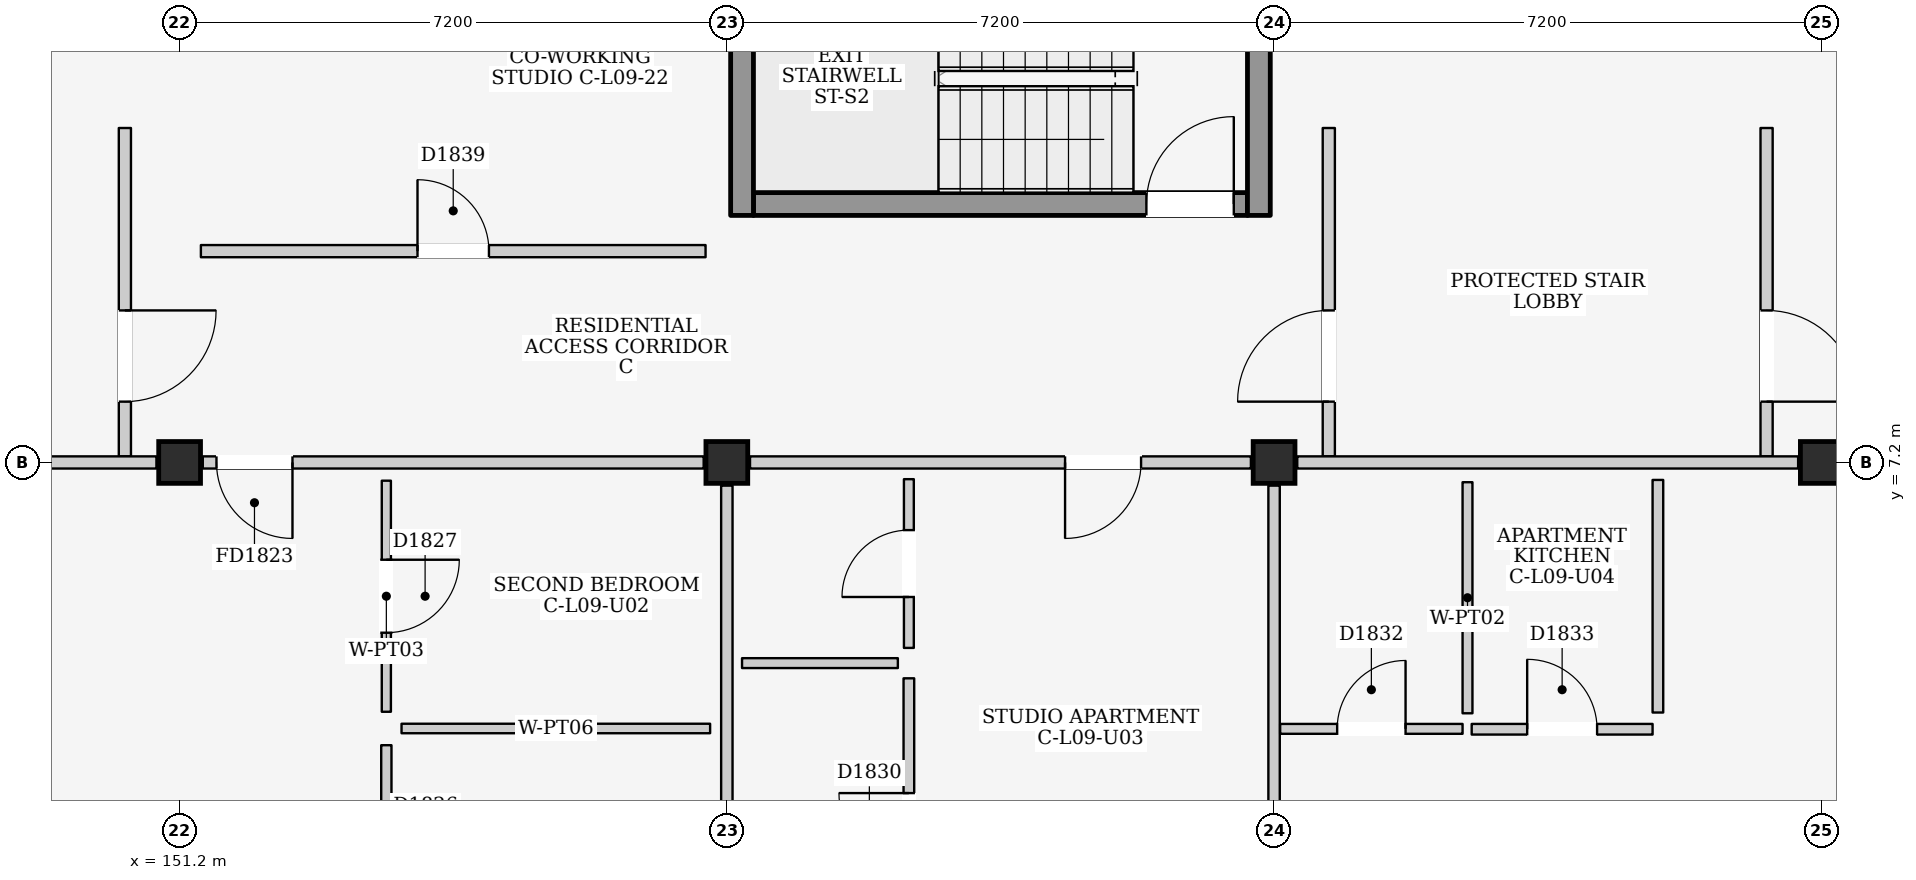
"""IFC4 building model, lengths in metres.
Left out: names, types, materials, properties, quantities, classifications, styles, units other than length and angle.
Written with IfcOpenShell. Run it as: python <this file> out.ifc"""

import sys

from ifc_helpers import new_model, si_unit, direction, frame, frame_2d, origin, origin_2d, place, context, subcontext, project, spatial, rectangle, extrude, element, fill, save


model = new_model("IFC4")
c1 = context("Model", 3, precision=1e-05, world=origin(), true_north=direction((0.0, 1.0)))
c2 = subcontext(c1, "Body", "Model", "MODEL_VIEW")
j1 = project(units=[si_unit("LENGTHUNIT", "METRE"), si_unit("PLANEANGLEUNIT", "RADIAN")], contexts=[c1])
p1 = place(None, origin())
s1 = spatial("IfcSite", under=j1, at=p1, CompositionType="ELEMENT")
p2 = place(p1, origin())
s2 = spatial("IfcBuilding", under=s1, at=p2, CompositionType="ELEMENT")
p3 = place(p2, frame((0.0, 0.0, 31.5)))
s3 = spatial("IfcBuildingStorey", under=s2, at=p3, CompositionType="ELEMENT", Elevation=31.5)
for number, where, z_axis, x_axis in (
    (1, (151.2, 7.2, 0.0), (0.0, 0.0, 1.0), (1.0, 0.0, 0.0)),
    (2, (158.4, 7.2, 0.0), (0.0, 0.0, 1.0), (1.0, 0.0, 0.0)),
    (3, (165.6, 7.2, 0.0), (0.0, 0.0, 1.0), (1.0, 0.0, 0.0)),
    (4, (172.8, 7.2, 0.0), (0.0, 0.0, 1.0), (1.0, 0.0, 0.0)),
):
    element("IfcColumn", number, at=place(p3, frame(where, z_axis=z_axis, x_axis=x_axis)), inside=s3, PredefinedType="COLUMN", context=c2, shape_type="SweptSolid", body=[
        extrude(rectangle(XDim=0.55, YDim=0.55, at=origin_2d()), origin(), (0.0, 0.0, 1.0), 3.3),
    ])
p4 = place(p3, frame((150.48, 7.28, 0.0), z_axis=(0.0, 0.0, 1.0), x_axis=(0.0, 1.0, 0.0)))
e5 = element("IfcWall", 5, at=p4, inside=s3, PredefinedType="PARTITIONING", context=c2, shape_type="SweptSolid", body=[
    extrude(rectangle(XDim=4.32, YDim=0.16, at=frame_2d((2.16, 0.0))), origin(), (0.0, 0.0, 1.0), 3.08),
])
p5 = place(p4, frame((0.72, 0.0, 0.0)))
e6 = element("IfcOpeningElement", 6, at=p5, cuts=e5, PredefinedType="OPENING", context=c2, shape_type="SweptSolid", body=[
    extrude(rectangle(XDim=1.2, YDim=2.2, at=frame_2d((0.6, 1.1))), frame((0.0, 0.095, 0.0), z_axis=(0.0, -1.0, 0.0), x_axis=(1.0, 0.0, 0.0)), (0.0, 0.0, 1.0), 0.19),
])
p6 = place(p3, frame((158.75, 10.6, 0.0), z_axis=(0.0, 0.0, 1.0), x_axis=(1.0, 0.0, 0.0)))
e7 = element("IfcWall", 7, at=p6, inside=s3, PredefinedType="SHEAR", context=c2, shape_type="SweptSolid", body=[
    extrude(rectangle(XDim=6.5, YDim=0.3, at=frame_2d((3.25, 0.0))), origin(), (0.0, 0.0, 1.0), 3.08),
])
p7 = place(p6, frame((5.17, 0.0, 0.0)))
e8 = element("IfcOpeningElement", 8, at=p7, cuts=e7, PredefinedType="OPENING", context=c2, shape_type="SweptSolid", body=[
    extrude(rectangle(XDim=1.15, YDim=2.2, at=frame_2d((0.575, 1.1))), frame((0.0, 0.165, 0.0), z_axis=(0.0, -1.0, 0.0), x_axis=(1.0, 0.0, 0.0)), (0.0, 0.0, 1.0), 0.33),
])
for number, where, z_axis, x_axis in (
    (9, (158.6, 10.45, 0.0), (0.0, 0.0, 1.0), (0.0, 1.0, 0.0)),
    (10, (165.4, 10.45, 0.0), (0.0, 0.0, 1.0), (0.0, 1.0, 0.0)),
):
    element("IfcWall", number, at=place(p3, frame(where, z_axis=z_axis, x_axis=x_axis)), inside=s3, PredefinedType="SHEAR", context=c2, shape_type="SweptSolid", body=[
        extrude(rectangle(XDim=3.6, YDim=0.3, at=frame_2d((1.8, 0.0))), origin(), (0.0, 0.0, 1.0), 3.08),
    ])
p8 = place(p3, frame((166.32, 7.28, 0.0), z_axis=(0.0, 0.0, 1.0), x_axis=(0.0, 1.0, 0.0)))
e11 = element("IfcWall", 11, at=p8, inside=s3, PredefinedType="PARTITIONING", context=c2, shape_type="SweptSolid", body=[
    extrude(rectangle(XDim=4.32, YDim=0.16, at=frame_2d((2.16, 0.0))), origin(), (0.0, 0.0, 1.0), 3.08),
])
p9 = place(p8, frame((0.72, 0.0, 0.0)))
e12 = element("IfcOpeningElement", 12, at=p9, cuts=e11, PredefinedType="OPENING", context=c2, shape_type="SweptSolid", body=[
    extrude(rectangle(XDim=1.2, YDim=2.2, at=frame_2d((0.6, 1.1))), frame((0.0, 0.095, 0.0), z_axis=(0.0, -1.0, 0.0), x_axis=(1.0, 0.0, 0.0)), (0.0, 0.0, 1.0), 0.19),
])
p10 = place(p3, frame((172.08, 7.28, 0.0), z_axis=(0.0, 0.0, 1.0), x_axis=(0.0, 1.0, 0.0)))
e13 = element("IfcWall", 13, at=p10, inside=s3, PredefinedType="PARTITIONING", context=c2, shape_type="SweptSolid", body=[
    extrude(rectangle(XDim=4.32, YDim=0.16, at=frame_2d((2.16, 0.0))), origin(), (0.0, 0.0, 1.0), 3.08),
])
p11 = place(p10, frame((0.72, 0.0, 0.0)))
e14 = element("IfcOpeningElement", 14, at=p11, cuts=e13, PredefinedType="OPENING", context=c2, shape_type="SweptSolid", body=[
    extrude(rectangle(XDim=1.2, YDim=2.2, at=frame_2d((0.6, 1.1))), frame((0.0, 0.095, 0.0), z_axis=(0.0, -1.0, 0.0), x_axis=(1.0, 0.0, 0.0)), (0.0, 0.0, 1.0), 0.19),
])
p12 = place(p3, frame((144.305, 7.2, 0.0), z_axis=(0.0, 0.0, 1.0), x_axis=(1.0, 0.0, 0.0)))
e15 = element("IfcWall", 15, at=p12, inside=s3, PredefinedType="PARTITIONING", context=c2, shape_type="SweptSolid", body=[
    extrude(rectangle(XDim=6.59, YDim=0.16, at=frame_2d((3.295, 0.0))), origin(), (0.0, 0.0, 1.0), 2.465),
])
p13 = place(p3, frame((151.505, 7.2, 0.0), z_axis=(0.0, 0.0, 1.0), x_axis=(1.0, 0.0, 0.0)))
e16 = element("IfcWall", 16, at=p13, inside=s3, PredefinedType="PARTITIONING", context=c2, shape_type="SweptSolid", body=[
    extrude(rectangle(XDim=6.59, YDim=0.16, at=frame_2d((3.295, 0.0))), origin(), (0.0, 0.0, 1.0), 2.465),
])
p14 = place(p13, frame((0.18, 0.0, 0.0)))
e17 = element("IfcOpeningElement", 17, at=p14, cuts=e16, PredefinedType="OPENING", context=c2, shape_type="SweptSolid", body=[
    extrude(rectangle(XDim=1.0, YDim=2.15, at=frame_2d((0.5, 1.075))), frame((0.0, 0.095, 0.0), z_axis=(0.0, -1.0, 0.0), x_axis=(1.0, 0.0, 0.0)), (0.0, 0.0, 1.0), 0.19),
])
p15 = place(p3, frame((158.4, 0.305, 0.0), z_axis=(0.0, 0.0, 1.0), x_axis=(0.0, 1.0, 0.0)))
e18 = element("IfcWall", 18, at=p15, inside=s3, PredefinedType="PARTITIONING", context=c2, shape_type="SweptSolid", body=[
    extrude(rectangle(XDim=6.59, YDim=0.15, at=frame_2d((3.295, 0.0))), origin(), (0.0, 0.0, 1.0), 2.565),
])
p16 = place(p3, frame((153.92, 0.44, 0.0), z_axis=(0.0, 0.0, 1.0), x_axis=(0.0, 1.0, 0.0)))
e19 = element("IfcWall", 19, at=p16, inside=s3, PredefinedType="PARTITIONING", context=c2, shape_type="SweptSolid", body=[
    extrude(rectangle(XDim=3.04, YDim=0.135, at=frame_2d((1.52, 0.0))), origin(), (0.0, 0.0, 1.0), 3.08),
])
p17 = place(p16, frame((1.045, 0.0, 0.0)))
e20 = element("IfcOpeningElement", 20, at=p17, cuts=e19, PredefinedType="OPENING", context=c2, shape_type="SweptSolid", body=[
    extrude(rectangle(XDim=0.95, YDim=2.15, at=frame_2d((0.475, 1.075))), frame((0.0, 0.083, 0.0), z_axis=(0.0, -1.0, 0.0), x_axis=(1.0, 0.0, 0.0)), (0.0, 0.0, 1.0), 0.165),
])
p18 = place(p3, frame((154.12, 3.7, 0.0), z_axis=(0.0, 0.0, 1.0), x_axis=(1.0, 0.0, 0.0)))
e21 = element("IfcWall", 21, at=p18, inside=s3, PredefinedType="PARTITIONING", context=c2, shape_type="SweptSolid", body=[
    extrude(rectangle(XDim=4.06, YDim=0.125, at=frame_2d((2.03, 0.0))), origin(), (0.0, 0.0, 1.0), 3.08),
])
p19 = place(p3, frame((153.92, 3.92, 0.0), z_axis=(0.0, 0.0, 1.0), x_axis=(0.0, 1.0, 0.0)))
e22 = element("IfcWall", 22, at=p19, inside=s3, PredefinedType="PARTITIONING", context=c2, shape_type="SweptSolid", body=[
    extrude(rectangle(XDim=3.04, YDim=0.12, at=frame_2d((1.52, 0.0))), origin(), (0.0, 0.0, 1.0), 3.08),
])
p20 = place(p19, frame((1.04, 0.0, 0.0)))
e23 = element("IfcOpeningElement", 23, at=p20, cuts=e22, PredefinedType="OPENING", context=c2, shape_type="SweptSolid", body=[
    extrude(rectangle(XDim=0.96, YDim=2.15, at=frame_2d((0.48, 1.075))), frame((0.0, 0.075, 0.0), z_axis=(0.0, -1.0, 0.0), x_axis=(1.0, 0.0, 0.0)), (0.0, 0.0, 1.0), 0.15),
])
p21 = place(p3, frame((158.705, 7.2, 0.0), z_axis=(0.0, 0.0, 1.0), x_axis=(1.0, 0.0, 0.0)))
e24 = element("IfcWall", 24, at=p21, inside=s3, PredefinedType="PARTITIONING", context=c2, shape_type="SweptSolid", body=[
    extrude(rectangle(XDim=6.59, YDim=0.16, at=frame_2d((3.295, 0.0))), origin(), (0.0, 0.0, 1.0), 2.465),
])
p22 = place(p21, frame((4.145, 0.0, 0.0)))
e25 = element("IfcOpeningElement", 25, at=p22, cuts=e24, PredefinedType="OPENING", context=c2, shape_type="SweptSolid", body=[
    extrude(rectangle(XDim=1.0, YDim=2.15, at=frame_2d((0.5, 1.075))), frame((0.0, 0.095, 0.0), z_axis=(0.0, -1.0, 0.0), x_axis=(1.0, 0.0, 0.0)), (0.0, 0.0, 1.0), 0.19),
])
p23 = place(p3, frame((165.6, 0.305, 0.0), z_axis=(0.0, 0.0, 1.0), x_axis=(0.0, 1.0, 0.0)))
e26 = element("IfcWall", 26, at=p23, inside=s3, PredefinedType="PARTITIONING", context=c2, shape_type="SweptSolid", body=[
    extrude(rectangle(XDim=6.59, YDim=0.15, at=frame_2d((3.295, 0.0))), origin(), (0.0, 0.0, 1.0), 2.565),
])
p24 = place(p3, frame((158.6, 4.56, 0.0), z_axis=(0.0, 0.0, 1.0), x_axis=(1.0, 0.0, 0.0)))
e27 = element("IfcWall", 27, at=p24, inside=s3, PredefinedType="PARTITIONING", context=c2, shape_type="SweptSolid", body=[
    extrude(rectangle(XDim=2.05, YDim=0.13, at=frame_2d((1.025, 0.0))), origin(), (0.0, 0.0, 1.0), 3.08),
])
p25 = place(p3, frame((160.795, 4.76, 0.0), z_axis=(0.0, 0.0, 1.0), x_axis=(0.0, 1.0, 0.0)))
e28 = element("IfcWall", 28, at=p25, inside=s3, PredefinedType="PARTITIONING", context=c2, shape_type="SweptSolid", body=[
    extrude(rectangle(XDim=2.22, YDim=0.13, at=frame_2d((1.11, 0.0))), origin(), (0.0, 0.0, 1.0), 3.08),
])
p26 = place(p25, frame((0.67, 0.0, 0.0)))
e29 = element("IfcOpeningElement", 29, at=p26, cuts=e28, PredefinedType="OPENING", context=c2, shape_type="SweptSolid", body=[
    extrude(rectangle(XDim=0.88, YDim=2.1, at=frame_2d((0.44, 1.05))), frame((0.0, 0.08, 0.0), z_axis=(0.0, -1.0, 0.0), x_axis=(1.0, 0.0, 0.0)), (0.0, 0.0, 1.0), 0.16),
])
p27 = place(p3, frame((160.795, 0.42, 0.0), z_axis=(0.0, 0.0, 1.0), x_axis=(0.0, 1.0, 0.0)))
e30 = element("IfcWall", 30, at=p27, inside=s3, PredefinedType="PARTITIONING", context=c2, shape_type="SweptSolid", body=[
    extrude(rectangle(XDim=3.94, YDim=0.14, at=frame_2d((1.97, 0.0))), origin(), (0.0, 0.0, 1.0), 3.08),
])
p28 = place(p27, frame((1.51, 0.0, 0.0)))
e31 = element("IfcOpeningElement", 31, at=p28, cuts=e30, PredefinedType="OPENING", context=c2, shape_type="SweptSolid", body=[
    extrude(rectangle(XDim=0.92, YDim=2.1, at=frame_2d((0.46, 1.05))), frame((0.0, 0.085, 0.0), z_axis=(0.0, -1.0, 0.0), x_axis=(1.0, 0.0, 0.0)), (0.0, 0.0, 1.0), 0.17),
])
p29 = place(p3, frame((165.905, 7.2, 0.0), z_axis=(0.0, 0.0, 1.0), x_axis=(1.0, 0.0, 0.0)))
e32 = element("IfcWall", 32, at=p29, inside=s3, PredefinedType="PARTITIONING", context=c2, shape_type="SweptSolid", body=[
    extrude(rectangle(XDim=6.59, YDim=0.16, at=frame_2d((3.295, 0.0))), origin(), (0.0, 0.0, 1.0), 2.465),
])
p30 = place(p3, frame((165.68, 3.695, 0.0), z_axis=(0.0, 0.0, 1.0), x_axis=(1.0, 0.0, 0.0)))
e33 = element("IfcWall", 33, at=p30, inside=s3, PredefinedType="PARTITIONING", context=c2, shape_type="SweptSolid", body=[
    extrude(rectangle(XDim=2.4, YDim=0.13, at=frame_2d((1.2, 0.0))), origin(), (0.0, 0.0, 1.0), 3.08),
])
p31 = place(p30, frame((0.75, 0.0, 0.0)))
e34 = element("IfcOpeningElement", 34, at=p31, cuts=e33, PredefinedType="OPENING", context=c2, shape_type="SweptSolid", body=[
    extrude(rectangle(XDim=0.9, YDim=2.1, at=frame_2d((0.45, 1.05))), frame((0.0, 0.08, 0.0), z_axis=(0.0, -1.0, 0.0), x_axis=(1.0, 0.0, 0.0)), (0.0, 0.0, 1.0), 0.16),
])
p32 = place(p3, frame((168.145, 3.9, 0.0), z_axis=(0.0, 0.0, 1.0), x_axis=(0.0, 1.0, 0.0)))
e35 = element("IfcWall", 35, at=p32, inside=s3, PredefinedType="PARTITIONING", context=c2, shape_type="SweptSolid", body=[
    extrude(rectangle(XDim=3.04, YDim=0.13, at=frame_2d((1.52, 0.0))), origin(), (0.0, 0.0, 1.0), 3.08),
])
p33 = place(p3, frame((168.2, 3.69, 0.0), z_axis=(0.0, 0.0, 1.0), x_axis=(1.0, 0.0, 0.0)))
e36 = element("IfcWall", 36, at=p33, inside=s3, PredefinedType="PARTITIONING", context=c2, shape_type="SweptSolid", body=[
    extrude(rectangle(XDim=2.38, YDim=0.14, at=frame_2d((1.19, 0.0))), origin(), (0.0, 0.0, 1.0), 3.08),
])
p34 = place(p33, frame((0.73, 0.0, 0.0)))
e37 = element("IfcOpeningElement", 37, at=p34, cuts=e36, PredefinedType="OPENING", context=c2, shape_type="SweptSolid", body=[
    extrude(rectangle(XDim=0.92, YDim=2.1, at=frame_2d((0.46, 1.05))), frame((0.0, 0.085, 0.0), z_axis=(0.0, -1.0, 0.0), x_axis=(1.0, 0.0, 0.0)), (0.0, 0.0, 1.0), 0.17),
])
p35 = place(p3, frame((170.65, 3.91, 0.0), z_axis=(0.0, 0.0, 1.0), x_axis=(0.0, 1.0, 0.0)))
e38 = element("IfcWall", 38, at=p35, inside=s3, PredefinedType="PARTITIONING", context=c2, shape_type="SweptSolid", body=[
    extrude(rectangle(XDim=3.06, YDim=0.14, at=frame_2d((1.53, 0.0))), origin(), (0.0, 0.0, 1.0), 3.08),
])
p36 = place(p3, frame((151.48, 9.98, 0.0), z_axis=(0.0, 0.0, 1.0), x_axis=(1.0, 0.0, 0.0)))
e39 = element("IfcWall", 39, at=p36, inside=s3, PredefinedType="PARTITIONING", context=c2, shape_type="SweptSolid", body=[
    extrude(rectangle(XDim=6.64, YDim=0.16, at=frame_2d((3.32, 0.0))), origin(), (0.0, 0.0, 1.0), 3.08),
])
p37 = place(p36, frame((2.85, 0.0, 0.0)))
e40 = element("IfcOpeningElement", 40, at=p37, cuts=e39, PredefinedType="OPENING", context=c2, shape_type="SweptSolid", body=[
    extrude(rectangle(XDim=0.94, YDim=2.12, at=frame_2d((0.47, 1.06))), frame((0.0, 0.095, 0.0), z_axis=(0.0, -1.0, 0.0), x_axis=(1.0, 0.0, 0.0)), (0.0, 0.0, 1.0), 0.19),
])
p38 = place(p5, frame((1.2, 0.0, 0.0), z_axis=(0.0, 0.0, 1.0), x_axis=(-1.0, 0.0, 0.0)))
e41 = element("IfcDoor", 41, at=p38, inside=s3, OperationType="SINGLE_SWING_LEFT", PredefinedType="DOOR", context=c2, shape_type="SweptSolid", body=[
    extrude(rectangle(XDim=1.2, YDim=2.2, at=frame_2d((0.6, 1.1))), frame((0.0, 0.025, 0.0), z_axis=(0.0, -1.0, 0.0), x_axis=(1.0, 0.0, 0.0)), (0.0, 0.0, 1.0), 0.05),
])
fill(e6, e41)
p39 = place(p7, origin())
e42 = element("IfcDoor", 42, at=p39, inside=s3, OperationType="SINGLE_SWING_RIGHT", PredefinedType="DOOR", context=c2, shape_type="SweptSolid", body=[
    extrude(rectangle(XDim=1.15, YDim=2.2, at=frame_2d((0.575, 1.1))), frame((0.0, 0.025, 0.0), z_axis=(0.0, -1.0, 0.0), x_axis=(1.0, 0.0, 0.0)), (0.0, 0.0, 1.0), 0.05),
])
fill(e8, e42)
p40 = place(p9, origin())
e43 = element("IfcDoor", 43, at=p40, inside=s3, OperationType="SINGLE_SWING_LEFT", PredefinedType="DOOR", context=c2, shape_type="SweptSolid", body=[
    extrude(rectangle(XDim=1.2, YDim=2.2, at=frame_2d((0.6, 1.1))), frame((0.0, 0.025, 0.0), z_axis=(0.0, -1.0, 0.0), x_axis=(1.0, 0.0, 0.0)), (0.0, 0.0, 1.0), 0.05),
])
fill(e12, e43)
p41 = place(p11, frame((1.2, 0.0, 0.0), z_axis=(0.0, 0.0, 1.0), x_axis=(-1.0, 0.0, 0.0)))
e44 = element("IfcDoor", 44, at=p41, inside=s3, OperationType="SINGLE_SWING_RIGHT", PredefinedType="DOOR", context=c2, shape_type="SweptSolid", body=[
    extrude(rectangle(XDim=1.2, YDim=2.2, at=frame_2d((0.6, 1.1))), frame((0.0, 0.025, 0.0), z_axis=(0.0, -1.0, 0.0), x_axis=(1.0, 0.0, 0.0)), (0.0, 0.0, 1.0), 0.05),
])
fill(e14, e44)
p42 = place(p14, frame((1.0, 0.0, 0.0), z_axis=(0.0, 0.0, 1.0), x_axis=(-1.0, 0.0, 0.0)))
e45 = element("IfcDoor", 45, at=p42, inside=s3, OperationType="SINGLE_SWING_LEFT", PredefinedType="DOOR", context=c2, shape_type="SweptSolid", body=[
    extrude(rectangle(XDim=1.0, YDim=2.15, at=frame_2d((0.5, 1.075))), frame((0.0, 0.025, 0.0), z_axis=(0.0, -1.0, 0.0), x_axis=(1.0, 0.0, 0.0)), (0.0, 0.0, 1.0), 0.05),
])
fill(e17, e45)
p43 = place(p20, frame((0.96, 0.0, 0.0), z_axis=(0.0, 0.0, 1.0), x_axis=(-1.0, 0.0, 0.0)))
e46 = element("IfcDoor", 46, at=p43, inside=s3, OperationType="SINGLE_SWING_LEFT", PredefinedType="DOOR", context=c2, shape_type="SweptSolid", body=[
    extrude(rectangle(XDim=0.96, YDim=2.15, at=frame_2d((0.48, 1.075))), frame((0.0, 0.025, 0.0), z_axis=(0.0, -1.0, 0.0), x_axis=(1.0, 0.0, 0.0)), (0.0, 0.0, 1.0), 0.05),
])
fill(e23, e46)
p44 = place(p22, frame((1.0, 0.0, 0.0), z_axis=(0.0, 0.0, 1.0), x_axis=(-1.0, 0.0, 0.0)))
e47 = element("IfcDoor", 47, at=p44, inside=s3, OperationType="SINGLE_SWING_RIGHT", PredefinedType="DOOR", context=c2, shape_type="SweptSolid", body=[
    extrude(rectangle(XDim=1.0, YDim=2.15, at=frame_2d((0.5, 1.075))), frame((0.0, 0.025, 0.0), z_axis=(0.0, -1.0, 0.0), x_axis=(1.0, 0.0, 0.0)), (0.0, 0.0, 1.0), 0.05),
])
fill(e25, e47)
p45 = place(p26, origin())
e48 = element("IfcDoor", 48, at=p45, inside=s3, OperationType="SINGLE_SWING_LEFT", PredefinedType="DOOR", context=c2, shape_type="SweptSolid", body=[
    extrude(rectangle(XDim=0.88, YDim=2.1, at=frame_2d((0.44, 1.05))), frame((0.0, 0.025, 0.0), z_axis=(0.0, -1.0, 0.0), x_axis=(1.0, 0.0, 0.0)), (0.0, 0.0, 1.0), 0.05),
])
fill(e29, e48)
p46 = place(p28, origin())
e49 = element("IfcDoor", 49, at=p46, inside=s3, OperationType="SINGLE_SWING_RIGHT", PredefinedType="DOOR", context=c2, shape_type="SweptSolid", body=[
    extrude(rectangle(XDim=0.92, YDim=2.1, at=frame_2d((0.46, 1.05))), frame((0.0, 0.025, 0.0), z_axis=(0.0, -1.0, 0.0), x_axis=(1.0, 0.0, 0.0)), (0.0, 0.0, 1.0), 0.05),
])
fill(e31, e49)
p47 = place(p31, origin())
e50 = element("IfcDoor", 50, at=p47, inside=s3, OperationType="SINGLE_SWING_RIGHT", PredefinedType="DOOR", context=c2, shape_type="SweptSolid", body=[
    extrude(rectangle(XDim=0.9, YDim=2.1, at=frame_2d((0.45, 1.05))), frame((0.0, 0.025, 0.0), z_axis=(0.0, -1.0, 0.0), x_axis=(1.0, 0.0, 0.0)), (0.0, 0.0, 1.0), 0.05),
])
fill(e34, e50)
p48 = place(p34, origin())
e51 = element("IfcDoor", 51, at=p48, inside=s3, OperationType="SINGLE_SWING_LEFT", PredefinedType="DOOR", context=c2, shape_type="SweptSolid", body=[
    extrude(rectangle(XDim=0.92, YDim=2.1, at=frame_2d((0.46, 1.05))), frame((0.0, 0.025, 0.0), z_axis=(0.0, -1.0, 0.0), x_axis=(1.0, 0.0, 0.0)), (0.0, 0.0, 1.0), 0.05),
])
fill(e37, e51)
p49 = place(p37, origin())
e52 = element("IfcDoor", 52, at=p49, inside=s3, OperationType="SINGLE_SWING_LEFT", PredefinedType="DOOR", context=c2, shape_type="SweptSolid", body=[
    extrude(rectangle(XDim=0.94, YDim=2.12, at=frame_2d((0.47, 1.06))), frame((0.0, 0.025, 0.0), z_axis=(0.0, -1.0, 0.0), x_axis=(1.0, 0.0, 0.0)), (0.0, 0.0, 1.0), 0.05),
])
fill(e40, e52)
save(model, sys.argv[1])
